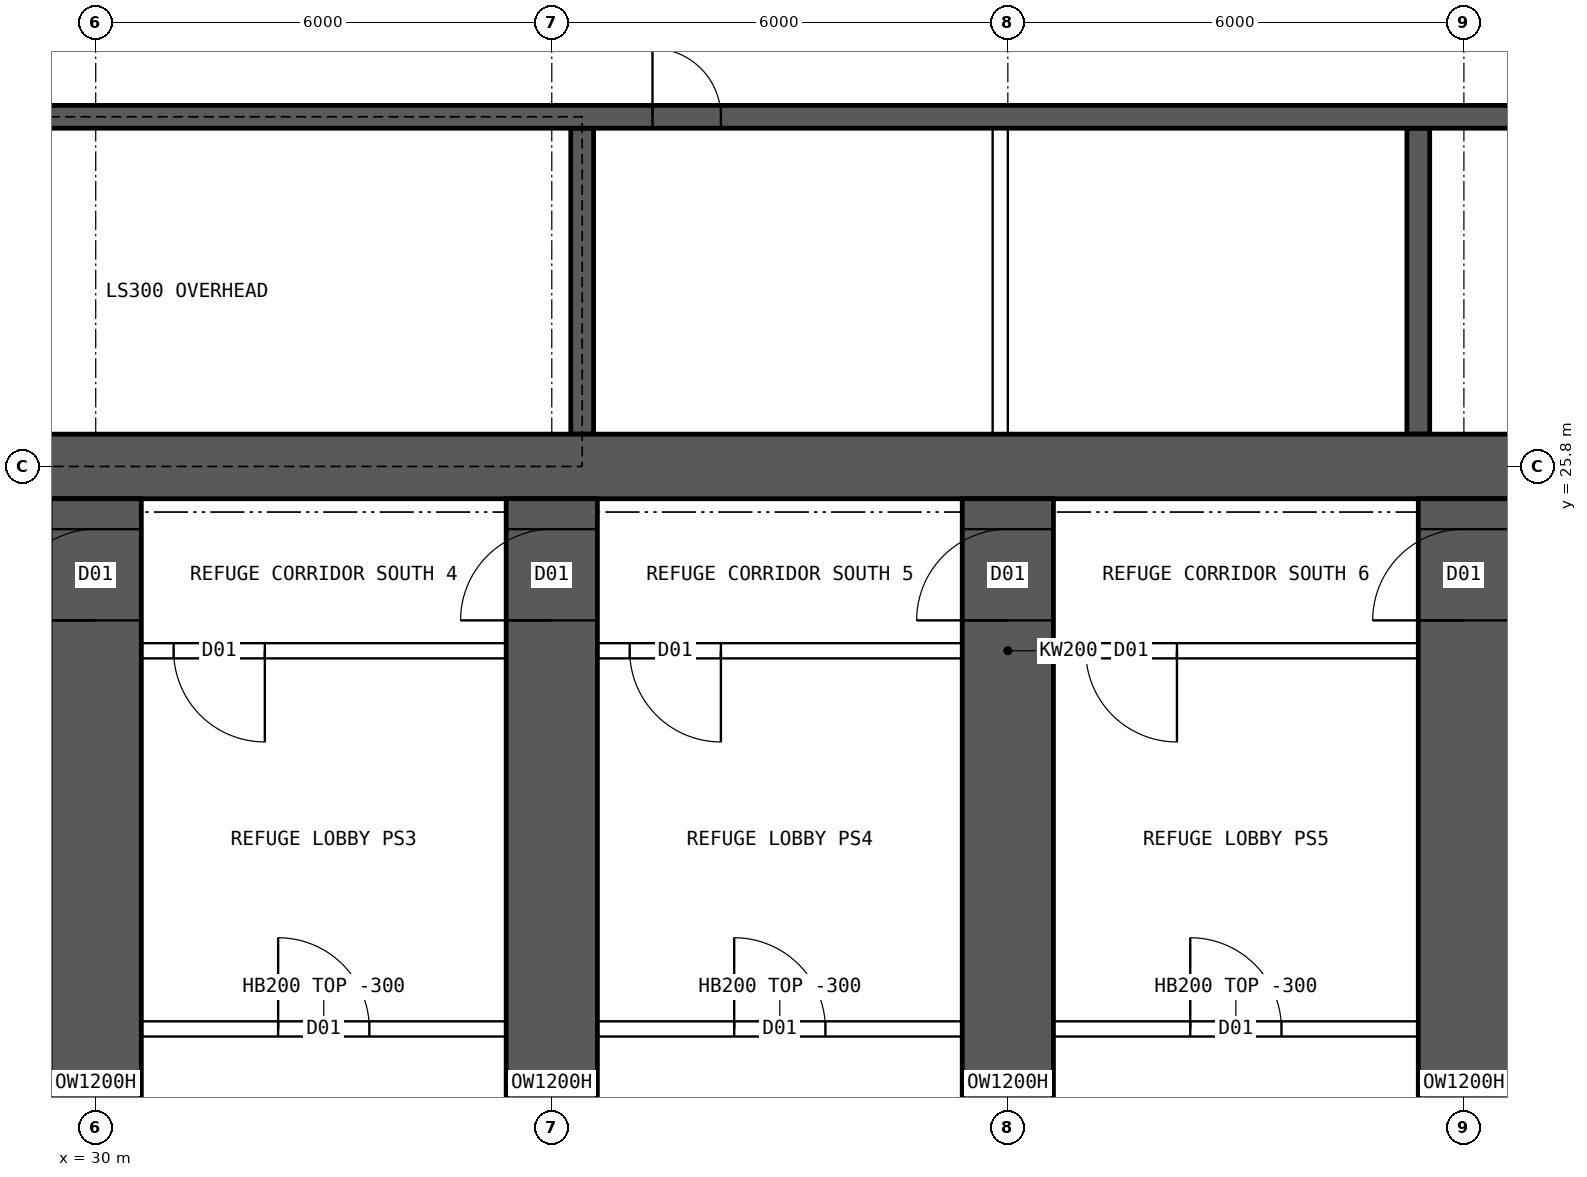
"""IFC4 building model, lengths in metres.
Left out: names, types, materials, properties, quantities, classifications, styles, units other than length and angle.
Written with IfcOpenShell. Run it as: python <this file> out.ifc"""

import sys

from ifc_helpers import new_model, si_unit, direction, frame, frame_2d, origin, place, context, subcontext, project, spatial, rectangle, extrude, element, fill, save


model = new_model("IFC4")
c1 = context("Model", 3, precision=1e-05, world=origin(), true_north=direction((0.0, 1.0)))
c2 = subcontext(c1, "Body", "Model", "MODEL_VIEW")
j1 = project(units=[si_unit("LENGTHUNIT", "METRE"), si_unit("PLANEANGLEUNIT", "RADIAN")], contexts=[c1])
p1 = place(None, origin())
s1 = spatial("IfcSite", under=j1, at=p1, CompositionType="ELEMENT")
p2 = place(p1, origin())
s2 = spatial("IfcBuilding", under=s1, at=p2, CompositionType="ELEMENT")
p3 = place(p2, frame((0.0, 0.0, 201.1)))
s3 = spatial("IfcBuildingStorey", under=s2, at=p3, CompositionType="ELEMENT", Elevation=201.1)
p4 = place(p3, frame((18.0, 25.8, 0.0), z_axis=(0.0, 0.0, 1.0), x_axis=(1.0, 0.0, 0.0)))
e1 = element("IfcWall", 1, at=p4, inside=s3, PredefinedType="SHEAR", context=c2, shape_type="SweptSolid", body=[
    extrude(rectangle(XDim=48.0, YDim=0.85, at=frame_2d((24.0, 0.0))), origin(), (0.0, 0.0, 1.0), 7.2),
])
p5 = place(p3, frame((18.425, 30.4, 0.0), z_axis=(0.0, 0.0, 1.0), x_axis=(1.0, 0.0, 0.0)))
e2 = element("IfcWall", 2, at=p5, inside=s3, PredefinedType="SHEAR", context=c2, shape_type="SweptSolid", body=[
    extrude(rectangle(XDim=47.15, YDim=0.3, at=frame_2d((23.575, 0.0))), origin(), (0.0, 0.0, 1.0), 7.2),
])
p6 = place(p5, frame((0.4, 0.0, 0.0)))
e3 = element("IfcOpeningElement", 3, at=p6, cuts=e2, PredefinedType="OPENING", context=c2, shape_type="SweptSolid", body=[
    extrude(rectangle(XDim=1.0, YDim=2.1, at=frame_2d((0.5, 1.05))), frame((0.0, 0.16, 0.0), z_axis=(0.0, -1.0, 0.0), x_axis=(1.0, 0.0, 0.0)), (0.0, 0.0, 1.0), 0.32),
])
p7 = place(p5, frame((45.75, 0.0, 0.0)))
e4 = element("IfcOpeningElement", 4, at=p7, cuts=e2, PredefinedType="OPENING", context=c2, shape_type="SweptSolid", body=[
    extrude(rectangle(XDim=1.0, YDim=2.1, at=frame_2d((0.5, 1.05))), frame((0.0, 0.16, 0.0), z_axis=(0.0, -1.0, 0.0), x_axis=(1.0, 0.0, 0.0)), (0.0, 0.0, 1.0), 0.32),
])
p8 = place(p5, frame((18.9, 0.0, 0.0)))
e5 = element("IfcOpeningElement", 5, at=p8, cuts=e2, PredefinedType="OPENING", context=c2, shape_type="SweptSolid", body=[
    extrude(rectangle(XDim=0.9, YDim=2.1, at=frame_2d((0.45, 1.05))), frame((0.0, 0.16, 0.0), z_axis=(0.0, -1.0, 0.0), x_axis=(1.0, 0.0, 0.0)), (0.0, 0.0, 1.0), 0.32),
])
p9 = place(p5, frame((30.192, 0.0, 0.0)))
e6 = element("IfcOpeningElement", 6, at=p9, cuts=e2, PredefinedType="OPENING", context=c2, shape_type="SweptSolid", body=[
    extrude(rectangle(XDim=1.1, YDim=2.1, at=frame_2d((0.55, 1.05))), frame((0.0, 0.16, 0.0), z_axis=(0.0, -1.0, 0.0), x_axis=(1.0, 0.0, 0.0)), (0.0, 0.0, 1.0), 0.32),
])
p10 = place(p5, frame((33.725, 0.0, 0.0)))
e7 = element("IfcOpeningElement", 7, at=p10, cuts=e2, PredefinedType="OPENING", context=c2, shape_type="SweptSolid", body=[
    extrude(rectangle(XDim=1.1, YDim=2.1, at=frame_2d((0.55, 1.05))), frame((0.0, 0.16, 0.0), z_axis=(0.0, -1.0, 0.0), x_axis=(1.0, 0.0, 0.0)), (0.0, 0.0, 1.0), 0.32),
])
p11 = place(p5, frame((37.258, 0.0, 0.0)))
e8 = element("IfcOpeningElement", 8, at=p11, cuts=e2, PredefinedType="OPENING", context=c2, shape_type="SweptSolid", body=[
    extrude(rectangle(XDim=1.1, YDim=2.1, at=frame_2d((0.55, 1.05))), frame((0.0, 0.16, 0.0), z_axis=(0.0, -1.0, 0.0), x_axis=(1.0, 0.0, 0.0)), (0.0, 0.0, 1.0), 0.32),
])
for number, where, z_axis, x_axis in (
    (9, (36.4, 26.225, 0.0), (0.0, 0.0, 1.0), (0.0, 1.0, 0.0)),
    (10, (47.4, 26.225, 0.0), (0.0, 0.0, 1.0), (0.0, 1.0, 0.0)),
):
    element("IfcWall", number, at=place(p3, frame(where, z_axis=z_axis, x_axis=x_axis)), inside=s3, PredefinedType="SHEAR", context=c2, shape_type="SweptSolid", body=[
        extrude(rectangle(XDim=4.025, YDim=0.3, at=frame_2d((2.012, 0.0))), origin(), (0.0, 0.0, 1.0), 7.2),
    ])
p12 = place(p3, frame((30.0, 10.0, 0.0), z_axis=(0.0, 0.0, 1.0), x_axis=(0.0, 1.0, 0.0)))
e11 = element("IfcWall", 11, at=p12, inside=s3, PredefinedType="SHEAR", context=c2, shape_type="SweptSolid", body=[
    extrude(rectangle(XDim=15.375, YDim=1.2, at=frame_2d((7.688, 0.0))), origin(), (0.0, 0.0, 1.0), 7.2),
])
p13 = place(p12, frame((13.775, 0.0, 0.0)))
e12 = element("IfcOpeningElement", 12, at=p13, cuts=e11, PredefinedType="OPENING", context=c2, shape_type="SweptSolid", body=[
    extrude(rectangle(XDim=1.2, YDim=2.1, at=frame_2d((0.6, 1.05))), frame((0.0, 0.61, 0.0), z_axis=(0.0, -1.0, 0.0), x_axis=(1.0, 0.0, 0.0)), (0.0, 0.0, 1.0), 1.22),
])
p14 = place(p3, frame((36.0, 10.0, 0.0), z_axis=(0.0, 0.0, 1.0), x_axis=(0.0, 1.0, 0.0)))
e13 = element("IfcWall", 13, at=p14, inside=s3, PredefinedType="SHEAR", context=c2, shape_type="SweptSolid", body=[
    extrude(rectangle(XDim=15.375, YDim=1.2, at=frame_2d((7.688, 0.0))), origin(), (0.0, 0.0, 1.0), 7.2),
])
p15 = place(p14, frame((13.775, 0.0, 0.0)))
e14 = element("IfcOpeningElement", 14, at=p15, cuts=e13, PredefinedType="OPENING", context=c2, shape_type="SweptSolid", body=[
    extrude(rectangle(XDim=1.2, YDim=2.1, at=frame_2d((0.6, 1.05))), frame((0.0, 0.61, 0.0), z_axis=(0.0, -1.0, 0.0), x_axis=(1.0, 0.0, 0.0)), (0.0, 0.0, 1.0), 1.22),
])
p16 = place(p3, frame((42.0, 10.0, 0.0), z_axis=(0.0, 0.0, 1.0), x_axis=(0.0, 1.0, 0.0)))
e15 = element("IfcWall", 15, at=p16, inside=s3, PredefinedType="SHEAR", context=c2, shape_type="SweptSolid", body=[
    extrude(rectangle(XDim=15.375, YDim=1.2, at=frame_2d((7.688, 0.0))), origin(), (0.0, 0.0, 1.0), 7.2),
])
p17 = place(p16, frame((13.775, 0.0, 0.0)))
e16 = element("IfcOpeningElement", 16, at=p17, cuts=e15, PredefinedType="OPENING", context=c2, shape_type="SweptSolid", body=[
    extrude(rectangle(XDim=1.2, YDim=2.1, at=frame_2d((0.6, 1.05))), frame((0.0, 0.61, 0.0), z_axis=(0.0, -1.0, 0.0), x_axis=(1.0, 0.0, 0.0)), (0.0, 0.0, 1.0), 1.22),
])
p18 = place(p3, frame((48.0, 10.0, 0.0), z_axis=(0.0, 0.0, 1.0), x_axis=(0.0, 1.0, 0.0)))
e17 = element("IfcWall", 17, at=p18, inside=s3, PredefinedType="SHEAR", context=c2, shape_type="SweptSolid", body=[
    extrude(rectangle(XDim=15.375, YDim=1.2, at=frame_2d((7.688, 0.0))), origin(), (0.0, 0.0, 1.0), 7.2),
])
p19 = place(p18, frame((13.775, 0.0, 0.0)))
e18 = element("IfcOpeningElement", 18, at=p19, cuts=e17, PredefinedType="OPENING", context=c2, shape_type="SweptSolid", body=[
    extrude(rectangle(XDim=1.2, YDim=2.1, at=frame_2d((0.6, 1.05))), frame((0.0, 0.61, 0.0), z_axis=(0.0, -1.0, 0.0), x_axis=(1.0, 0.0, 0.0)), (0.0, 0.0, 1.0), 1.22),
])
p20 = place(p3, frame((41.9, 26.225, 0.0), z_axis=(0.0, 0.0, 1.0), x_axis=(0.0, 1.0, 0.0)))
e19 = element("IfcWall", 19, at=p20, inside=s3, PredefinedType="SOLIDWALL", context=c2, shape_type="SweptSolid", body=[
    extrude(rectangle(XDim=4.025, YDim=0.2, at=frame_2d((2.012, 0.0))), origin(), (0.0, 0.0, 1.0), 6.9),
])
p21 = place(p3, frame((68.4, 23.375, 0.0), z_axis=(0.0, 0.0, 1.0), x_axis=(-1.0, 0.0, 0.0)))
e20 = element("IfcWall", 20, at=p21, inside=s3, PredefinedType="SOLIDWALL", context=c2, shape_type="SweptSolid", body=[
    extrude(rectangle(XDim=52.8, YDim=0.2, at=frame_2d((26.4, 0.0))), origin(), (0.0, 0.0, 1.0), 6.9),
])
p22 = place(p21, frame((51.0, 0.0, 0.0)))
e21 = element("IfcOpeningElement", 21, at=p22, cuts=e20, PredefinedType="OPENING", context=c2, shape_type="SweptSolid", body=[
    extrude(rectangle(XDim=1.2, YDim=2.1, at=frame_2d((0.6, 1.05))), frame((0.0, 0.11, 0.0), z_axis=(0.0, -1.0, 0.0), x_axis=(1.0, 0.0, 0.0)), (0.0, 0.0, 1.0), 0.22),
])
p23 = place(p21, frame((48.175, 0.0, 0.0)))
e22 = element("IfcOpeningElement", 22, at=p23, cuts=e20, PredefinedType="OPENING", context=c2, shape_type="SweptSolid", body=[
    extrude(rectangle(XDim=1.2, YDim=2.1, at=frame_2d((0.6, 1.05))), frame((0.0, 0.11, 0.0), z_axis=(0.0, -1.0, 0.0), x_axis=(1.0, 0.0, 0.0)), (0.0, 0.0, 1.0), 0.22),
])
p24 = place(p21, frame((42.175, 0.0, 0.0)))
e23 = element("IfcOpeningElement", 23, at=p24, cuts=e20, PredefinedType="OPENING", context=c2, shape_type="SweptSolid", body=[
    extrude(rectangle(XDim=1.2, YDim=2.1, at=frame_2d((0.6, 1.05))), frame((0.0, 0.11, 0.0), z_axis=(0.0, -1.0, 0.0), x_axis=(1.0, 0.0, 0.0)), (0.0, 0.0, 1.0), 0.22),
])
p25 = place(p21, frame((36.175, 0.0, 0.0)))
e24 = element("IfcOpeningElement", 24, at=p25, cuts=e20, PredefinedType="OPENING", context=c2, shape_type="SweptSolid", body=[
    extrude(rectangle(XDim=1.2, YDim=2.1, at=frame_2d((0.6, 1.05))), frame((0.0, 0.11, 0.0), z_axis=(0.0, -1.0, 0.0), x_axis=(1.0, 0.0, 0.0)), (0.0, 0.0, 1.0), 0.22),
])
p26 = place(p21, frame((30.175, 0.0, 0.0)))
e25 = element("IfcOpeningElement", 25, at=p26, cuts=e20, PredefinedType="OPENING", context=c2, shape_type="SweptSolid", body=[
    extrude(rectangle(XDim=1.2, YDim=2.1, at=frame_2d((0.6, 1.05))), frame((0.0, 0.11, 0.0), z_axis=(0.0, -1.0, 0.0), x_axis=(1.0, 0.0, 0.0)), (0.0, 0.0, 1.0), 0.22),
])
p27 = place(p21, frame((24.175, 0.0, 0.0)))
e26 = element("IfcOpeningElement", 26, at=p27, cuts=e20, PredefinedType="OPENING", context=c2, shape_type="SweptSolid", body=[
    extrude(rectangle(XDim=1.2, YDim=2.1, at=frame_2d((0.6, 1.05))), frame((0.0, 0.11, 0.0), z_axis=(0.0, -1.0, 0.0), x_axis=(1.0, 0.0, 0.0)), (0.0, 0.0, 1.0), 0.22),
])
p28 = place(p21, frame((18.175, 0.0, 0.0)))
e27 = element("IfcOpeningElement", 27, at=p28, cuts=e20, PredefinedType="OPENING", context=c2, shape_type="SweptSolid", body=[
    extrude(rectangle(XDim=1.2, YDim=2.1, at=frame_2d((0.6, 1.05))), frame((0.0, 0.11, 0.0), z_axis=(0.0, -1.0, 0.0), x_axis=(1.0, 0.0, 0.0)), (0.0, 0.0, 1.0), 0.22),
])
p29 = place(p21, frame((12.175, 0.0, 0.0)))
e28 = element("IfcOpeningElement", 28, at=p29, cuts=e20, PredefinedType="OPENING", context=c2, shape_type="SweptSolid", body=[
    extrude(rectangle(XDim=1.2, YDim=2.1, at=frame_2d((0.6, 1.05))), frame((0.0, 0.11, 0.0), z_axis=(0.0, -1.0, 0.0), x_axis=(1.0, 0.0, 0.0)), (0.0, 0.0, 1.0), 0.22),
])
p30 = place(p21, frame((6.175, 0.0, 0.0)))
e29 = element("IfcOpeningElement", 29, at=p30, cuts=e20, PredefinedType="OPENING", context=c2, shape_type="SweptSolid", body=[
    extrude(rectangle(XDim=1.2, YDim=2.1, at=frame_2d((0.6, 1.05))), frame((0.0, 0.11, 0.0), z_axis=(0.0, -1.0, 0.0), x_axis=(1.0, 0.0, 0.0)), (0.0, 0.0, 1.0), 0.22),
])
p31 = place(p21, frame((0.175, 0.0, 0.0)))
e30 = element("IfcOpeningElement", 30, at=p31, cuts=e20, PredefinedType="OPENING", context=c2, shape_type="SweptSolid", body=[
    extrude(rectangle(XDim=1.2, YDim=2.1, at=frame_2d((0.6, 1.05))), frame((0.0, 0.11, 0.0), z_axis=(0.0, -1.0, 0.0), x_axis=(1.0, 0.0, 0.0)), (0.0, 0.0, 1.0), 0.22),
])
p32 = place(p3, frame((24.425, 18.4, 0.0), z_axis=(0.0, 0.0, 1.0), x_axis=(1.0, 0.0, 0.0)))
e31 = element("IfcWall", 31, at=p32, inside=s3, PredefinedType="SOLIDWALL", context=c2, shape_type="SweptSolid", body=[
    extrude(rectangle(XDim=5.15, YDim=0.2, at=frame_2d((2.575, 0.0))), origin(), (0.0, 0.0, 1.0), 6.9),
])
p33 = place(p32, frame((1.975, 0.0, 0.0)))
e32 = element("IfcOpeningElement", 32, at=p33, cuts=e31, PredefinedType="OPENING", context=c2, shape_type="SweptSolid", body=[
    extrude(rectangle(XDim=1.2, YDim=2.1, at=frame_2d((0.6, 1.05))), frame((0.0, 0.11, 0.0), z_axis=(0.0, -1.0, 0.0), x_axis=(1.0, 0.0, 0.0)), (0.0, 0.0, 1.0), 0.22),
])
p34 = place(p3, frame((30.425, 18.4, 0.0), z_axis=(0.0, 0.0, 1.0), x_axis=(1.0, 0.0, 0.0)))
e33 = element("IfcWall", 33, at=p34, inside=s3, PredefinedType="SOLIDWALL", context=c2, shape_type="SweptSolid", body=[
    extrude(rectangle(XDim=5.15, YDim=0.2, at=frame_2d((2.575, 0.0))), origin(), (0.0, 0.0, 1.0), 6.9),
])
p35 = place(p34, frame((1.975, 0.0, 0.0)))
e34 = element("IfcOpeningElement", 34, at=p35, cuts=e33, PredefinedType="OPENING", context=c2, shape_type="SweptSolid", body=[
    extrude(rectangle(XDim=1.2, YDim=2.1, at=frame_2d((0.6, 1.05))), frame((0.0, 0.11, 0.0), z_axis=(0.0, -1.0, 0.0), x_axis=(1.0, 0.0, 0.0)), (0.0, 0.0, 1.0), 0.22),
])
p36 = place(p3, frame((36.425, 18.4, 0.0), z_axis=(0.0, 0.0, 1.0), x_axis=(1.0, 0.0, 0.0)))
e35 = element("IfcWall", 35, at=p36, inside=s3, PredefinedType="SOLIDWALL", context=c2, shape_type="SweptSolid", body=[
    extrude(rectangle(XDim=5.15, YDim=0.2, at=frame_2d((2.575, 0.0))), origin(), (0.0, 0.0, 1.0), 6.9),
])
p37 = place(p36, frame((1.975, 0.0, 0.0)))
e36 = element("IfcOpeningElement", 36, at=p37, cuts=e35, PredefinedType="OPENING", context=c2, shape_type="SweptSolid", body=[
    extrude(rectangle(XDim=1.2, YDim=2.1, at=frame_2d((0.6, 1.05))), frame((0.0, 0.11, 0.0), z_axis=(0.0, -1.0, 0.0), x_axis=(1.0, 0.0, 0.0)), (0.0, 0.0, 1.0), 0.22),
])
p38 = place(p3, frame((42.425, 18.4, 0.0), z_axis=(0.0, 0.0, 1.0), x_axis=(1.0, 0.0, 0.0)))
e37 = element("IfcWall", 37, at=p38, inside=s3, PredefinedType="SOLIDWALL", context=c2, shape_type="SweptSolid", body=[
    extrude(rectangle(XDim=5.15, YDim=0.2, at=frame_2d((2.575, 0.0))), origin(), (0.0, 0.0, 1.0), 6.9),
])
p39 = place(p38, frame((1.975, 0.0, 0.0)))
e38 = element("IfcOpeningElement", 38, at=p39, cuts=e37, PredefinedType="OPENING", context=c2, shape_type="SweptSolid", body=[
    extrude(rectangle(XDim=1.2, YDim=2.1, at=frame_2d((0.6, 1.05))), frame((0.0, 0.11, 0.0), z_axis=(0.0, -1.0, 0.0), x_axis=(1.0, 0.0, 0.0)), (0.0, 0.0, 1.0), 0.22),
])
p40 = place(p3, frame((48.425, 18.4, 0.0), z_axis=(0.0, 0.0, 1.0), x_axis=(1.0, 0.0, 0.0)))
e39 = element("IfcWall", 39, at=p40, inside=s3, PredefinedType="SOLIDWALL", context=c2, shape_type="SweptSolid", body=[
    extrude(rectangle(XDim=5.15, YDim=0.2, at=frame_2d((2.575, 0.0))), origin(), (0.0, 0.0, 1.0), 6.9),
])
p41 = place(p40, frame((1.975, 0.0, 0.0)))
e40 = element("IfcOpeningElement", 40, at=p41, cuts=e39, PredefinedType="OPENING", context=c2, shape_type="SweptSolid", body=[
    extrude(rectangle(XDim=1.2, YDim=2.1, at=frame_2d((0.6, 1.05))), frame((0.0, 0.11, 0.0), z_axis=(0.0, -1.0, 0.0), x_axis=(1.0, 0.0, 0.0)), (0.0, 0.0, 1.0), 0.22),
])
p42 = place(p8, origin())
e41 = element("IfcDoor", 41, at=p42, inside=s3, OperationType="SINGLE_SWING_LEFT", PredefinedType="DOOR", context=c2, shape_type="SweptSolid", body=[
    extrude(rectangle(XDim=0.9, YDim=2.1, at=frame_2d((0.45, 1.05))), frame((0.0, 0.025, 0.0), z_axis=(0.0, -1.0, 0.0), x_axis=(1.0, 0.0, 0.0)), (0.0, 0.0, 1.0), 0.05),
])
fill(e5, e41)
p43 = place(p35, origin())
e42 = element("IfcDoor", 42, at=p43, inside=s3, OperationType="SINGLE_SWING_LEFT", PredefinedType="DOOR", context=c2, shape_type="SweptSolid", body=[
    extrude(rectangle(XDim=1.2, YDim=2.1, at=frame_2d((0.6, 1.05))), frame((0.0, 0.025, 0.0), z_axis=(0.0, -1.0, 0.0), x_axis=(1.0, 0.0, 0.0)), (0.0, 0.0, 1.0), 0.05),
])
fill(e34, e42)
p44 = place(p37, origin())
e43 = element("IfcDoor", 43, at=p44, inside=s3, OperationType="SINGLE_SWING_LEFT", PredefinedType="DOOR", context=c2, shape_type="SweptSolid", body=[
    extrude(rectangle(XDim=1.2, YDim=2.1, at=frame_2d((0.6, 1.05))), frame((0.0, 0.025, 0.0), z_axis=(0.0, -1.0, 0.0), x_axis=(1.0, 0.0, 0.0)), (0.0, 0.0, 1.0), 0.05),
])
fill(e36, e43)
p45 = place(p39, origin())
e44 = element("IfcDoor", 44, at=p45, inside=s3, OperationType="SINGLE_SWING_LEFT", PredefinedType="DOOR", context=c2, shape_type="SweptSolid", body=[
    extrude(rectangle(XDim=1.2, YDim=2.1, at=frame_2d((0.6, 1.05))), frame((0.0, 0.025, 0.0), z_axis=(0.0, -1.0, 0.0), x_axis=(1.0, 0.0, 0.0)), (0.0, 0.0, 1.0), 0.05),
])
fill(e38, e44)
p46 = place(p25, origin())
e45 = element("IfcDoor", 45, at=p46, inside=s3, OperationType="SINGLE_SWING_LEFT", PredefinedType="DOOR", context=c2, shape_type="SweptSolid", body=[
    extrude(rectangle(XDim=1.2, YDim=2.1, at=frame_2d((0.6, 1.05))), frame((0.0, 0.025, 0.0), z_axis=(0.0, -1.0, 0.0), x_axis=(1.0, 0.0, 0.0)), (0.0, 0.0, 1.0), 0.05),
])
fill(e24, e45)
p47 = place(p26, origin())
e46 = element("IfcDoor", 46, at=p47, inside=s3, OperationType="SINGLE_SWING_LEFT", PredefinedType="DOOR", context=c2, shape_type="SweptSolid", body=[
    extrude(rectangle(XDim=1.2, YDim=2.1, at=frame_2d((0.6, 1.05))), frame((0.0, 0.025, 0.0), z_axis=(0.0, -1.0, 0.0), x_axis=(1.0, 0.0, 0.0)), (0.0, 0.0, 1.0), 0.05),
])
fill(e25, e46)
p48 = place(p27, origin())
e47 = element("IfcDoor", 47, at=p48, inside=s3, OperationType="SINGLE_SWING_LEFT", PredefinedType="DOOR", context=c2, shape_type="SweptSolid", body=[
    extrude(rectangle(XDim=1.2, YDim=2.1, at=frame_2d((0.6, 1.05))), frame((0.0, 0.025, 0.0), z_axis=(0.0, -1.0, 0.0), x_axis=(1.0, 0.0, 0.0)), (0.0, 0.0, 1.0), 0.05),
])
fill(e26, e47)
p49 = place(p13, origin())
e48 = element("IfcDoor", 48, at=p49, inside=s3, OperationType="SINGLE_SWING_LEFT", PredefinedType="DOOR", context=c2, shape_type="SweptSolid", body=[
    extrude(rectangle(XDim=1.2, YDim=2.1, at=frame_2d((0.6, 1.05))), frame((0.0, 0.025, 0.0), z_axis=(0.0, -1.0, 0.0), x_axis=(1.0, 0.0, 0.0)), (0.0, 0.0, 1.0), 0.05),
])
fill(e12, e48)
p50 = place(p15, origin())
e49 = element("IfcDoor", 49, at=p50, inside=s3, OperationType="SINGLE_SWING_LEFT", PredefinedType="DOOR", context=c2, shape_type="SweptSolid", body=[
    extrude(rectangle(XDim=1.2, YDim=2.1, at=frame_2d((0.6, 1.05))), frame((0.0, 0.025, 0.0), z_axis=(0.0, -1.0, 0.0), x_axis=(1.0, 0.0, 0.0)), (0.0, 0.0, 1.0), 0.05),
])
fill(e14, e49)
p51 = place(p17, origin())
e50 = element("IfcDoor", 50, at=p51, inside=s3, OperationType="SINGLE_SWING_LEFT", PredefinedType="DOOR", context=c2, shape_type="SweptSolid", body=[
    extrude(rectangle(XDim=1.2, YDim=2.1, at=frame_2d((0.6, 1.05))), frame((0.0, 0.025, 0.0), z_axis=(0.0, -1.0, 0.0), x_axis=(1.0, 0.0, 0.0)), (0.0, 0.0, 1.0), 0.05),
])
fill(e16, e50)
p52 = place(p19, origin())
e51 = element("IfcDoor", 51, at=p52, inside=s3, OperationType="SINGLE_SWING_LEFT", PredefinedType="DOOR", context=c2, shape_type="SweptSolid", body=[
    extrude(rectangle(XDim=1.2, YDim=2.1, at=frame_2d((0.6, 1.05))), frame((0.0, 0.025, 0.0), z_axis=(0.0, -1.0, 0.0), x_axis=(1.0, 0.0, 0.0)), (0.0, 0.0, 1.0), 0.05),
])
fill(e18, e51)
save(model, sys.argv[1])
